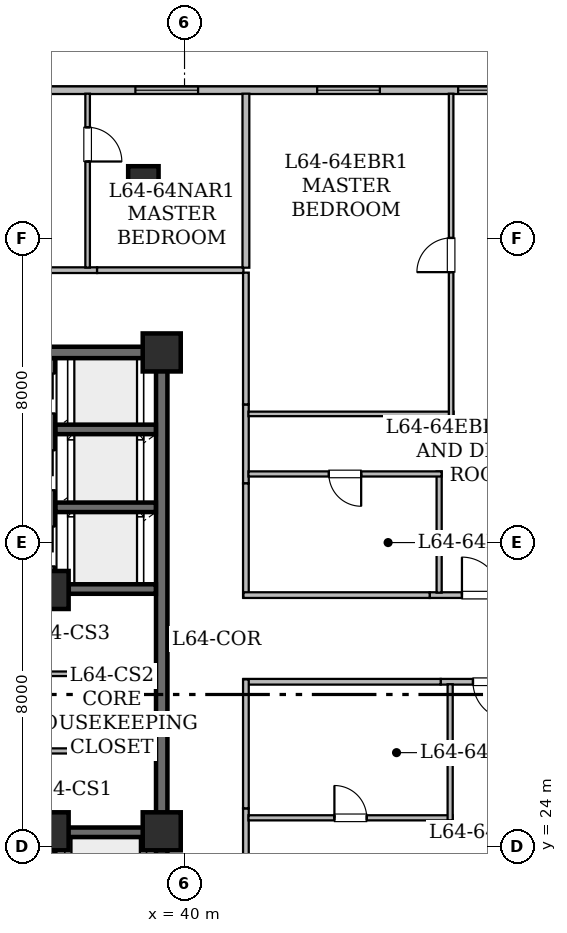
"""IFC4 building model, lengths in metres.
Left out: names, types, materials, properties, quantities, classifications, styles, units other than length and angle.
Written with IfcOpenShell. Run it as: python <this file> out.ifc"""

import sys

from ifc_helpers import new_model, si_unit, direction, frame, frame_2d, origin, origin_2d, place, context, subcontext, project, spatial, rectangle, hollow_rectangle, extrude, element, fill, save


model = new_model("IFC4")
c1 = context("Model", 3, precision=1e-05, world=origin(), true_north=direction((0.0, 1.0)))
c2 = subcontext(c1, "Body", "Model", "MODEL_VIEW")
j1 = project(units=[si_unit("LENGTHUNIT", "METRE"), si_unit("PLANEANGLEUNIT", "RADIAN")], contexts=[c1])
p1 = place(None, origin())
s1 = spatial("IfcSite", under=j1, at=p1, CompositionType="ELEMENT")
p2 = place(p1, origin())
s2 = spatial("IfcBuilding", under=s1, at=p2, CompositionType="ELEMENT")
p3 = place(p2, frame((0.0, 0.0, 250.05)))
s3 = spatial("IfcBuildingStorey", under=s2, at=p3, CompositionType="ELEMENT", Elevation=250.05)
for number, where, z_axis, x_axis in (
    (1, (36.45, 24.4, 0.0), (0.0, 0.0, 1.0), (1.0, 0.0, 0.0)),
    (2, (39.4, 24.4, 0.0), (0.0, 0.0, 1.0), (1.0, 0.0, 0.0)),
    (3, (36.45, 30.75, 0.0), (0.0, 0.0, 1.0), (1.0, 0.0, 0.0)),
    (4, (39.4, 37.0, 0.0), (0.0, 0.0, 1.0), (1.0, 0.0, 0.0)),
):
    element("IfcColumn", number, at=place(p3, frame(where, z_axis=z_axis, x_axis=x_axis)), inside=s3, PredefinedType="COLUMN", context=c2, shape_type="SweptSolid", body=[
        extrude(hollow_rectangle(XDim=1.0, YDim=1.0, WallThickness=0.05, at=origin_2d()), origin(), (0.0, 0.0, 1.0), 3.65),
    ])
p4 = place(p3, frame((38.917, 41.5, 0.0), z_axis=(0.0, 0.0, 1.0), x_axis=(1.0, 0.0, 0.0)))
e5 = element("IfcColumn", 5, at=p4, inside=s3, PredefinedType="COLUMN", context=c2, shape_type="SweptSolid", body=[
    extrude(hollow_rectangle(XDim=0.8, YDim=0.8, WallThickness=0.04, at=origin_2d()), origin(), (0.0, 0.0, 1.0), 3.65),
])
p5 = place(p3, frame((24.302, 43.9, 0.0), z_axis=(0.0, 0.0, 1.0), x_axis=(1.0, 0.0, 0.0)))
e6 = element("IfcWall", 6, at=p5, inside=s3, PredefinedType="STANDARD", context=c2, shape_type="SweptSolid", body=[
    extrude(rectangle(XDim=41.457, YDim=0.2, at=frame_2d((20.729, 0.0))), origin(), (0.0, 0.0, 1.0), 3.43),
])
p6 = place(p5, frame((0.604, 0.0, 0.85)))
e7 = element("IfcOpeningElement", 7, at=p6, cuts=e6, PredefinedType="OPENING", context=c2, shape_type="SweptSolid", body=[
    extrude(rectangle(XDim=1.65, YDim=1.55, at=frame_2d((0.825, 0.775))), frame((0.0, 0.11, 0.0), z_axis=(0.0, -1.0, 0.0), x_axis=(1.0, 0.0, 0.0)), (0.0, 0.0, 1.0), 0.22),
])
p7 = place(p5, frame((9.098, 0.0, 0.85)))
e8 = element("IfcOpeningElement", 8, at=p7, cuts=e6, PredefinedType="OPENING", context=c2, shape_type="SweptSolid", body=[
    extrude(rectangle(XDim=1.65, YDim=1.55, at=frame_2d((0.825, 0.775))), frame((0.0, 0.11, 0.0), z_axis=(0.0, -1.0, 0.0), x_axis=(1.0, 0.0, 0.0)), (0.0, 0.0, 1.0), 0.22),
])
p8 = place(p5, frame((14.405, 0.0, 0.85)))
e9 = element("IfcOpeningElement", 9, at=p8, cuts=e6, PredefinedType="OPENING", context=c2, shape_type="SweptSolid", body=[
    extrude(rectangle(XDim=1.65, YDim=1.55, at=frame_2d((0.825, 0.775))), frame((0.0, 0.11, 0.0), z_axis=(0.0, -1.0, 0.0), x_axis=(1.0, 0.0, 0.0)), (0.0, 0.0, 1.0), 0.22),
])
p9 = place(p5, frame((22.898, 0.0, 0.8)))
e10 = element("IfcOpeningElement", 10, at=p9, cuts=e6, PredefinedType="OPENING", context=c2, shape_type="SweptSolid", body=[
    extrude(rectangle(XDim=1.2, YDim=1.5, at=frame_2d((0.6, 0.75))), frame((0.0, 0.11, 0.0), z_axis=(0.0, -1.0, 0.0), x_axis=(1.0, 0.0, 0.0)), (0.0, 0.0, 1.0), 0.22),
])
p10 = place(p5, frame((19.188, 0.0, 0.85)))
e11 = element("IfcOpeningElement", 11, at=p10, cuts=e6, PredefinedType="OPENING", context=c2, shape_type="SweptSolid", body=[
    extrude(rectangle(XDim=1.65, YDim=1.55, at=frame_2d((0.825, 0.775))), frame((0.0, 0.11, 0.0), z_axis=(0.0, -1.0, 0.0), x_axis=(1.0, 0.0, 0.0)), (0.0, 0.0, 1.0), 0.22),
])
p11 = place(p5, frame((26.158, 0.0, 0.85)))
e12 = element("IfcOpeningElement", 12, at=p11, cuts=e6, PredefinedType="OPENING", context=c2, shape_type="SweptSolid", body=[
    extrude(rectangle(XDim=1.65, YDim=1.55, at=frame_2d((0.825, 0.775))), frame((0.0, 0.11, 0.0), z_axis=(0.0, -1.0, 0.0), x_axis=(1.0, 0.0, 0.0)), (0.0, 0.0, 1.0), 0.22),
])
p12 = place(p5, frame((32.408, 0.0, 0.85)))
e13 = element("IfcOpeningElement", 13, at=p12, cuts=e6, PredefinedType="OPENING", context=c2, shape_type="SweptSolid", body=[
    extrude(rectangle(XDim=1.65, YDim=1.55, at=frame_2d((0.825, 0.775))), frame((0.0, 0.11, 0.0), z_axis=(0.0, -1.0, 0.0), x_axis=(1.0, 0.0, 0.0)), (0.0, 0.0, 1.0), 0.22),
])
p13 = place(p3, frame((29.0, 37.0, 0.0), z_axis=(0.0, 0.0, 1.0), x_axis=(1.0, 0.0, 0.0)))
e14 = element("IfcWall", 14, at=p13, inside=s3, PredefinedType="SHEAR", context=c2, shape_type="SweptSolid", body=[
    extrude(rectangle(XDim=10.4, YDim=0.3, at=frame_2d((5.2, 0.0))), origin(), (0.0, 0.0, 1.0), 3.43),
])
p14 = place(p13, frame((5.14, 0.0, 0.0)))
e15 = element("IfcOpeningElement", 15, at=p14, cuts=e14, PredefinedType="OPENING", context=c2, shape_type="SweptSolid", body=[
    extrude(rectangle(XDim=1.15, YDim=2.2, at=frame_2d((0.575, 1.1))), frame((0.0, 0.16, 0.0), z_axis=(0.0, -1.0, 0.0), x_axis=(1.0, 0.0, 0.0)), (0.0, 0.0, 1.0), 0.32),
])
p15 = place(p3, frame((39.4, 19.0, 0.0), z_axis=(0.0, 0.0, 1.0), x_axis=(0.0, 1.0, 0.0)))
e16 = element("IfcWall", 16, at=p15, inside=s3, PredefinedType="SHEAR", context=c2, shape_type="SweptSolid", body=[
    extrude(rectangle(XDim=5.4, YDim=0.3, at=frame_2d((2.7, 0.0))), origin(), (0.0, 0.0, 1.0), 3.43),
])
p16 = place(p3, frame((39.4, 24.4, 0.0), z_axis=(0.0, 0.0, 1.0), x_axis=(0.0, 1.0, 0.0)))
e17 = element("IfcWall", 17, at=p16, inside=s3, PredefinedType="SHEAR", context=c2, shape_type="SweptSolid", body=[
    extrude(rectangle(XDim=12.6, YDim=0.3, at=frame_2d((6.3, 0.0))), origin(), (0.0, 0.0, 1.0), 3.43),
])
p17 = place(p3, frame((36.45, 19.154, 0.0), z_axis=(0.0, 0.0, 1.0), x_axis=(0.0, 1.0, 0.0)))
e18 = element("IfcWall", 18, at=p17, inside=s3, PredefinedType="SHEAR", context=c2, shape_type="SweptSolid", body=[
    extrude(rectangle(XDim=4.746, YDim=0.3, at=frame_2d((2.373, 0.0))), origin(), (0.0, 0.0, 1.0), 3.43),
])
p18 = place(p17, frame((0.696, 0.0, 0.0)))
e19 = element("IfcOpeningElement", 19, at=p18, cuts=e18, PredefinedType="OPENING", context=c2, shape_type="SweptSolid", body=[
    extrude(rectangle(XDim=1.1, YDim=2.15, at=frame_2d((0.55, 1.075))), frame((0.0, 0.16, 0.0), z_axis=(0.0, -1.0, 0.0), x_axis=(1.0, 0.0, 0.0)), (0.0, 0.0, 1.0), 0.32),
])
p19 = place(p17, frame((3.316, 0.0, 0.0)))
e20 = element("IfcOpeningElement", 20, at=p19, cuts=e18, PredefinedType="OPENING", context=c2, shape_type="SweptSolid", body=[
    extrude(rectangle(XDim=1.1, YDim=2.15, at=frame_2d((0.55, 1.075))), frame((0.0, 0.16, 0.0), z_axis=(0.0, -1.0, 0.0), x_axis=(1.0, 0.0, 0.0)), (0.0, 0.0, 1.0), 0.32),
])
p20 = place(p3, frame((36.45, 31.25, 0.0), z_axis=(0.0, 0.0, 1.0), x_axis=(0.0, 1.0, 0.0)))
e21 = element("IfcWall", 21, at=p20, inside=s3, PredefinedType="SHEAR", context=c2, shape_type="SweptSolid", body=[
    extrude(rectangle(XDim=5.596, YDim=0.3, at=frame_2d((2.798, 0.0))), origin(), (0.0, 0.0, 1.0), 3.43),
])
p21 = place(p20, frame((0.12, 0.0, 0.0)))
e22 = element("IfcOpeningElement", 22, at=p21, cuts=e21, PredefinedType="OPENING", context=c2, shape_type="SweptSolid", body=[
    extrude(rectangle(XDim=1.05, YDim=2.15, at=frame_2d((0.525, 1.075))), frame((0.0, 0.16, 0.0), z_axis=(0.0, -1.0, 0.0), x_axis=(1.0, 0.0, 0.0)), (0.0, 0.0, 1.0), 0.32),
])
p22 = place(p20, frame((2.125, 0.0, 0.0)))
e23 = element("IfcOpeningElement", 23, at=p22, cuts=e21, PredefinedType="OPENING", context=c2, shape_type="SweptSolid", body=[
    extrude(rectangle(XDim=1.05, YDim=2.15, at=frame_2d((0.525, 1.075))), frame((0.0, 0.16, 0.0), z_axis=(0.0, -1.0, 0.0), x_axis=(1.0, 0.0, 0.0)), (0.0, 0.0, 1.0), 0.32),
])
p23 = place(p20, frame((4.145, 0.0, 0.0)))
e24 = element("IfcOpeningElement", 24, at=p23, cuts=e21, PredefinedType="OPENING", context=c2, shape_type="SweptSolid", body=[
    extrude(rectangle(XDim=1.05, YDim=2.15, at=frame_2d((0.525, 1.075))), frame((0.0, 0.16, 0.0), z_axis=(0.0, -1.0, 0.0), x_axis=(1.0, 0.0, 0.0)), (0.0, 0.0, 1.0), 0.32),
])
p24 = place(p3, frame((36.604, 24.375, 0.0), z_axis=(0.0, 0.0, 1.0), x_axis=(1.0, 0.0, 0.0)))
e25 = element("IfcWall", 25, at=p24, inside=s3, PredefinedType="SHEAR", context=c2, shape_type="SweptSolid", body=[
    extrude(rectangle(XDim=2.642, YDim=0.25, at=frame_2d((1.321, 0.0))), origin(), (0.0, 0.0, 1.0), 3.43),
])
p25 = place(p3, frame((36.954, 30.775, 0.0), z_axis=(0.0, 0.0, 1.0), x_axis=(1.0, 0.0, 0.0)))
e26 = element("IfcWall", 26, at=p25, inside=s3, PredefinedType="SHEAR", context=c2, shape_type="SweptSolid", body=[
    extrude(rectangle(XDim=2.292, YDim=0.25, at=frame_2d((1.146, 0.0))), origin(), (0.0, 0.0, 1.0), 3.43),
])
for number, where, z_axis, x_axis in (
    (27, (36.604, 32.925, 0.0), (0.0, 0.0, 1.0), (1.0, 0.0, 0.0)),
    (28, (36.604, 34.975, 0.0), (0.0, 0.0, 1.0), (1.0, 0.0, 0.0)),
):
    element("IfcWall", number, at=place(p3, frame(where, z_axis=z_axis, x_axis=x_axis)), inside=s3, PredefinedType="SHEAR", context=c2, shape_type="SweptSolid", body=[
        extrude(rectangle(XDim=2.642, YDim=0.25, at=frame_2d((1.321, 0.0))), origin(), (0.0, 0.0, 1.0), 3.43),
    ])
p26 = place(p3, frame((34.612, 26.515, 0.0), z_axis=(0.0, 0.0, 1.0), x_axis=(1.0, 0.0, 0.0)))
e29 = element("IfcWall", 29, at=p26, inside=s3, PredefinedType="PARTITIONING", context=c2, shape_type="SweptSolid", body=[
    extrude(rectangle(XDim=4.644, YDim=0.135, at=frame_2d((2.322, 0.0))), origin(), (0.0, 0.0, 1.0), 3.43),
])
p27 = place(p3, frame((34.612, 28.545, 0.0), z_axis=(0.0, 0.0, 1.0), x_axis=(1.0, 0.0, 0.0)))
e30 = element("IfcWall", 30, at=p27, inside=s3, PredefinedType="PARTITIONING", context=c2, shape_type="SweptSolid", body=[
    extrude(rectangle(XDim=4.644, YDim=0.12, at=frame_2d((2.322, 0.0))), origin(), (0.0, 0.0, 1.0), 3.43),
])
p28 = place(p3, frame((30.751, 39.165, 0.0), z_axis=(0.0, 0.0, 1.0), x_axis=(1.0, 0.0, 0.0)))
e31 = element("IfcWall", 31, at=p28, inside=s3, PredefinedType="STANDARD", context=c2, shape_type="SweptSolid", body=[
    extrude(rectangle(XDim=6.948, YDim=0.15, at=frame_2d((3.474, 0.0))), origin(), (0.0, 0.0, 1.0), 3.43),
])
p29 = place(p28, frame((2.974, 0.0, 0.0)))
e32 = element("IfcOpeningElement", 32, at=p29, cuts=e31, PredefinedType="OPENING", context=c2, shape_type="SweptSolid", body=[
    extrude(rectangle(XDim=1.0, YDim=2.15, at=frame_2d((0.5, 1.075))), frame((0.0, 0.085, 0.0), z_axis=(0.0, -1.0, 0.0), x_axis=(1.0, 0.0, 0.0)), (0.0, 0.0, 1.0), 0.17),
])
p30 = place(p3, frame((37.699, 39.165, 0.0), z_axis=(0.0, 0.0, 1.0), x_axis=(1.0, 0.0, 0.0)))
e33 = element("IfcWall", 33, at=p30, inside=s3, PredefinedType="STANDARD", context=c2, shape_type="SweptSolid", body=[
    extrude(rectangle(XDim=3.851, YDim=0.15, at=frame_2d((1.926, 0.0))), origin(), (0.0, 0.0, 1.0), 2.725),
])
p31 = place(p3, frame((49.439, 28.335, 0.0), z_axis=(0.0, 0.0, 1.0), x_axis=(-1.0, 0.0, 0.0)))
e34 = element("IfcWall", 34, at=p31, inside=s3, PredefinedType="STANDARD", context=c2, shape_type="SweptSolid", body=[
    extrude(rectangle(XDim=2.698, YDim=0.15, at=frame_2d((1.349, 0.0))), origin(), (0.0, 0.0, 1.0), 3.43),
])
p32 = place(p31, frame((0.849, 0.0, 0.0)))
e35 = element("IfcOpeningElement", 35, at=p32, cuts=e34, PredefinedType="OPENING", context=c2, shape_type="SweptSolid", body=[
    extrude(rectangle(XDim=1.0, YDim=2.15, at=frame_2d((0.5, 1.075))), frame((0.0, 0.085, 0.0), z_axis=(0.0, -1.0, 0.0), x_axis=(1.0, 0.0, 0.0)), (0.0, 0.0, 1.0), 0.17),
])
p33 = place(p3, frame((41.615, 25.004, 0.0), z_axis=(0.0, 0.0, 1.0), x_axis=(0.0, -1.0, 0.0)))
e36 = element("IfcWall", 36, at=p33, inside=s3, PredefinedType="STANDARD", context=c2, shape_type="SweptSolid", body=[
    extrude(rectangle(XDim=2.078, YDim=0.15, at=frame_2d((1.039, 0.0))), origin(), (0.0, 0.0, 1.0), 3.43),
])
p34 = place(p3, frame((46.741, 28.335, 0.0), z_axis=(0.0, 0.0, 1.0), x_axis=(-1.0, 0.0, 0.0)))
e37 = element("IfcWall", 37, at=p34, inside=s3, PredefinedType="STANDARD", context=c2, shape_type="SweptSolid", body=[
    extrude(rectangle(XDim=5.191, YDim=0.15, at=frame_2d((2.595, 0.0))), origin(), (0.0, 0.0, 1.0), 3.43),
])
p35 = place(p3, frame((41.615, 28.398, 0.0), z_axis=(0.0, 0.0, 1.0), x_axis=(0.0, -1.0, 0.0)))
e38 = element("IfcWall", 38, at=p35, inside=s3, PredefinedType="STANDARD", context=c2, shape_type="SweptSolid", body=[
    extrude(rectangle(XDim=3.394, YDim=0.15, at=frame_2d((1.697, 0.0))), origin(), (0.0, 0.0, 1.0), 3.43),
])
p36 = place(p3, frame((41.615, 35.632, 0.0), z_axis=(0.0, 0.0, 1.0), x_axis=(0.0, -1.0, 0.0)))
e39 = element("IfcWall", 39, at=p36, inside=s3, PredefinedType="STANDARD", context=c2, shape_type="SweptSolid", body=[
    extrude(rectangle(XDim=2.078, YDim=0.15, at=frame_2d((1.039, 0.0))), origin(), (0.0, 0.0, 1.0), 3.43),
])
p37 = place(p3, frame((46.451, 30.615, 0.0), z_axis=(0.0, 0.0, 1.0), x_axis=(1.0, 0.0, 0.0)))
e40 = element("IfcWall", 40, at=p37, inside=s3, PredefinedType="STANDARD", context=c2, shape_type="SweptSolid", body=[
    extrude(rectangle(XDim=2.698, YDim=0.15, at=frame_2d((1.349, 0.0))), origin(), (0.0, 0.0, 1.0), 3.43),
])
p38 = place(p37, frame((0.849, 0.0, 0.0)))
e41 = element("IfcOpeningElement", 41, at=p38, cuts=e40, PredefinedType="OPENING", context=c2, shape_type="SweptSolid", body=[
    extrude(rectangle(XDim=1.0, YDim=2.15, at=frame_2d((0.5, 1.075))), frame((0.0, 0.085, 0.0), z_axis=(0.0, -1.0, 0.0), x_axis=(1.0, 0.0, 0.0)), (0.0, 0.0, 1.0), 0.17),
])
p39 = place(p3, frame((41.615, 33.554, 0.0), z_axis=(0.0, 0.0, 1.0), x_axis=(0.0, -1.0, 0.0)))
e42 = element("IfcWall", 42, at=p39, inside=s3, PredefinedType="STANDARD", context=c2, shape_type="SweptSolid", body=[
    extrude(rectangle(XDim=3.004, YDim=0.15, at=frame_2d((1.502, 0.0))), origin(), (0.0, 0.0, 1.0), 2.961),
])
p40 = place(p3, frame((41.55, 30.615, 0.0), z_axis=(0.0, 0.0, 1.0), x_axis=(1.0, 0.0, 0.0)))
e43 = element("IfcWall", 43, at=p40, inside=s3, PredefinedType="STANDARD", context=c2, shape_type="SweptSolid", body=[
    extrude(rectangle(XDim=4.901, YDim=0.15, at=frame_2d((2.45, 0.0))), origin(), (0.0, 0.0, 1.0), 3.43),
])
p41 = place(p3, frame((41.615, 39.1, 0.0), z_axis=(0.0, 0.0, 1.0), x_axis=(0.0, -1.0, 0.0)))
e44 = element("IfcWall", 44, at=p41, inside=s3, PredefinedType="STANDARD", context=c2, shape_type="SweptSolid", body=[
    extrude(rectangle(XDim=3.468, YDim=0.15, at=frame_2d((1.734, 0.0))), origin(), (0.0, 0.0, 1.0), 2.725),
])
p42 = place(p3, frame((37.45, 43.808, 0.0), z_axis=(0.0, 0.0, 1.0), x_axis=(0.0, -1.0, 0.0)))
e45 = element("IfcWall", 45, at=p42, inside=s3, PredefinedType="PARTITIONING", context=c2, shape_type="SweptSolid", body=[
    extrude(rectangle(XDim=4.576, YDim=0.12, at=frame_2d((2.288, 0.0))), origin(), (0.0, 0.0, 1.0), 2.887),
])
p43 = place(p42, frame((0.884, 0.0, 0.0)))
e46 = element("IfcOpeningElement", 46, at=p43, cuts=e45, PredefinedType="OPENING", context=c2, shape_type="SweptSolid", body=[
    extrude(rectangle(XDim=0.9, YDim=2.1, at=frame_2d((0.45, 1.05))), frame((0.0, 0.07, 0.0), z_axis=(0.0, -1.0, 0.0), x_axis=(1.0, 0.0, 0.0)), (0.0, 0.0, 1.0), 0.14),
])
p44 = place(p3, frame((41.615, 43.808, 0.0), z_axis=(0.0, 0.0, 1.0), x_axis=(0.0, -1.0, 0.0)))
e47 = element("IfcWall", 47, at=p44, inside=s3, PredefinedType="STANDARD", context=c2, shape_type="SweptSolid", body=[
    extrude(rectangle(XDim=4.578, YDim=0.18, at=frame_2d((2.289, 0.0))), origin(), (0.0, 0.0, 1.0), 2.887),
])
p45 = place(p3, frame((41.682, 24.755, 0.0), z_axis=(0.0, 0.0, 1.0), x_axis=(1.0, 0.0, 0.0)))
e48 = element("IfcWall", 48, at=p45, inside=s3, PredefinedType="PARTITIONING", context=c2, shape_type="SweptSolid", body=[
    extrude(rectangle(XDim=5.373, YDim=0.135, at=frame_2d((2.687, 0.0))), origin(), (0.0, 0.0, 1.0), 3.43),
])
p46 = place(p45, frame((2.262, 0.0, 0.0)))
e49 = element("IfcOpeningElement", 49, at=p46, cuts=e48, PredefinedType="OPENING", context=c2, shape_type="SweptSolid", body=[
    extrude(rectangle(XDim=0.85, YDim=2.1, at=frame_2d((0.425, 1.05))), frame((0.0, 0.077, 0.0), z_axis=(0.0, -1.0, 0.0), x_axis=(1.0, 0.0, 0.0)), (0.0, 0.0, 1.0), 0.155),
])
p47 = place(p3, frame((46.99, 24.69, 0.0), z_axis=(0.0, 0.0, 1.0), x_axis=(0.0, 1.0, 0.0)))
e50 = element("IfcWall", 50, at=p47, inside=s3, PredefinedType="PARTITIONING", context=c2, shape_type="SweptSolid", body=[
    extrude(rectangle(XDim=3.58, YDim=0.135, at=frame_2d((1.79, 0.0))), origin(), (0.0, 0.0, 1.0), 3.43),
])
p48 = place(p3, frame((46.7, 30.68, 0.0), z_axis=(0.0, 0.0, 1.0), x_axis=(0.0, 1.0, 0.0)))
e51 = element("IfcWall", 51, at=p48, inside=s3, PredefinedType="PARTITIONING", context=c2, shape_type="SweptSolid", body=[
    extrude(rectangle(XDim=3.188, YDim=0.135, at=frame_2d((1.594, 0.0))), origin(), (0.0, 0.0, 1.0), 2.961),
])
p49 = place(p3, frame((46.765, 33.803, 0.0), z_axis=(0.0, 0.0, 1.0), x_axis=(-1.0, 0.0, 0.0)))
e52 = element("IfcWall", 52, at=p49, inside=s3, PredefinedType="PARTITIONING", context=c2, shape_type="SweptSolid", body=[
    extrude(rectangle(XDim=5.083, YDim=0.135, at=frame_2d((2.542, 0.0))), origin(), (0.0, 0.0, 1.0), 3.43),
])
p50 = place(p49, frame((2.117, 0.0, 0.0)))
e53 = element("IfcOpeningElement", 53, at=p50, cuts=e52, PredefinedType="OPENING", context=c2, shape_type="SweptSolid", body=[
    extrude(rectangle(XDim=0.85, YDim=2.1, at=frame_2d((0.425, 1.05))), frame((0.0, 0.077, 0.0), z_axis=(0.0, -1.0, 0.0), x_axis=(1.0, 0.0, 0.0)), (0.0, 0.0, 1.0), 0.155),
])
p51 = place(p3, frame((41.682, 35.383, 0.0), z_axis=(0.0, 0.0, 1.0), x_axis=(1.0, 0.0, 0.0)))
e54 = element("IfcWall", 54, at=p51, inside=s3, PredefinedType="PARTITIONING", context=c2, shape_type="SweptSolid", body=[
    extrude(rectangle(XDim=5.398, YDim=0.12, at=frame_2d((2.699, 0.0))), origin(), (0.0, 0.0, 1.0), 3.43),
])
p52 = place(p3, frame((47.015, 35.318, 0.0), z_axis=(0.0, 0.0, 1.0), x_axis=(0.0, 1.0, 0.0)))
e55 = element("IfcWall", 55, at=p52, inside=s3, PredefinedType="PARTITIONING", context=c2, shape_type="SweptSolid", body=[
    extrude(rectangle(XDim=8.49, YDim=0.12, at=frame_2d((4.245, 0.0))), origin(), (0.0, 0.0, 1.0), 2.725),
])
p53 = place(p52, frame((3.795, 0.0, 0.0)))
e56 = element("IfcOpeningElement", 56, at=p53, cuts=e55, PredefinedType="OPENING", context=c2, shape_type="SweptSolid", body=[
    extrude(rectangle(XDim=0.9, YDim=2.1, at=frame_2d((0.45, 1.05))), frame((0.0, 0.07, 0.0), z_axis=(0.0, -1.0, 0.0), x_axis=(1.0, 0.0, 0.0)), (0.0, 0.0, 1.0), 0.14),
])
p54 = place(p8, origin())
e57 = element("IfcWindow", 57, at=p54, inside=s3, PartitioningType="SINGLE_PANEL", PredefinedType="WINDOW", context=c2, shape_type="SweptSolid", body=[
    extrude(rectangle(XDim=1.65, YDim=1.55, at=frame_2d((0.825, 0.775))), frame((0.0, 0.03, 0.0), z_axis=(0.0, -1.0, 0.0), x_axis=(1.0, 0.0, 0.0)), (0.0, 0.0, 1.0), 0.06),
])
fill(e9, e57)
p55 = place(p9, origin())
e58 = element("IfcWindow", 58, at=p55, inside=s3, PartitioningType="SINGLE_PANEL", PredefinedType="WINDOW", context=c2, shape_type="SweptSolid", body=[
    extrude(rectangle(XDim=1.2, YDim=1.5, at=frame_2d((0.6, 0.75))), frame((0.0, 0.03, 0.0), z_axis=(0.0, -1.0, 0.0), x_axis=(1.0, 0.0, 0.0)), (0.0, 0.0, 1.0), 0.06),
])
fill(e10, e58)
p56 = place(p10, origin())
e59 = element("IfcWindow", 59, at=p56, inside=s3, PartitioningType="SINGLE_PANEL", PredefinedType="WINDOW", context=c2, shape_type="SweptSolid", body=[
    extrude(rectangle(XDim=1.65, YDim=1.55, at=frame_2d((0.825, 0.775))), frame((0.0, 0.03, 0.0), z_axis=(0.0, -1.0, 0.0), x_axis=(1.0, 0.0, 0.0)), (0.0, 0.0, 1.0), 0.06),
])
fill(e11, e59)
p57 = place(p32, origin())
e60 = element("IfcDoor", 60, at=p57, inside=s3, OperationType="SINGLE_SWING_LEFT", PredefinedType="DOOR", context=c2, shape_type="SweptSolid", body=[
    extrude(rectangle(XDim=1.0, YDim=2.15, at=frame_2d((0.5, 1.075))), frame((0.0, 0.025, 0.0), z_axis=(0.0, -1.0, 0.0), x_axis=(1.0, 0.0, 0.0)), (0.0, 0.0, 1.0), 0.05),
])
fill(e35, e60)
p58 = place(p38, origin())
e61 = element("IfcDoor", 61, at=p58, inside=s3, OperationType="SINGLE_SWING_LEFT", PredefinedType="DOOR", context=c2, shape_type="SweptSolid", body=[
    extrude(rectangle(XDim=1.0, YDim=2.15, at=frame_2d((0.5, 1.075))), frame((0.0, 0.025, 0.0), z_axis=(0.0, -1.0, 0.0), x_axis=(1.0, 0.0, 0.0)), (0.0, 0.0, 1.0), 0.05),
])
fill(e41, e61)
p59 = place(p43, origin())
e62 = element("IfcDoor", 62, at=p59, inside=s3, OperationType="SINGLE_SWING_RIGHT", PredefinedType="DOOR", context=c2, shape_type="SweptSolid", body=[
    extrude(rectangle(XDim=0.9, YDim=2.1, at=frame_2d((0.45, 1.05))), frame((0.0, 0.025, 0.0), z_axis=(0.0, -1.0, 0.0), x_axis=(1.0, 0.0, 0.0)), (0.0, 0.0, 1.0), 0.05),
])
fill(e46, e62)
p60 = place(p46, origin())
e63 = element("IfcDoor", 63, at=p60, inside=s3, OperationType="SINGLE_SWING_LEFT", PredefinedType="DOOR", context=c2, shape_type="SweptSolid", body=[
    extrude(rectangle(XDim=0.85, YDim=2.1, at=frame_2d((0.425, 1.05))), frame((0.0, 0.025, 0.0), z_axis=(0.0, -1.0, 0.0), x_axis=(1.0, 0.0, 0.0)), (0.0, 0.0, 1.0), 0.05),
])
fill(e49, e63)
p61 = place(p50, origin())
e64 = element("IfcDoor", 64, at=p61, inside=s3, OperationType="SINGLE_SWING_LEFT", PredefinedType="DOOR", context=c2, shape_type="SweptSolid", body=[
    extrude(rectangle(XDim=0.85, YDim=2.1, at=frame_2d((0.425, 1.05))), frame((0.0, 0.025, 0.0), z_axis=(0.0, -1.0, 0.0), x_axis=(1.0, 0.0, 0.0)), (0.0, 0.0, 1.0), 0.05),
])
fill(e53, e64)
p62 = place(p53, origin())
e65 = element("IfcDoor", 65, at=p62, inside=s3, OperationType="SINGLE_SWING_LEFT", PredefinedType="DOOR", context=c2, shape_type="SweptSolid", body=[
    extrude(rectangle(XDim=0.9, YDim=2.1, at=frame_2d((0.45, 1.05))), frame((0.0, 0.025, 0.0), z_axis=(0.0, -1.0, 0.0), x_axis=(1.0, 0.0, 0.0)), (0.0, 0.0, 1.0), 0.05),
])
fill(e56, e65)
save(model, sys.argv[1])
